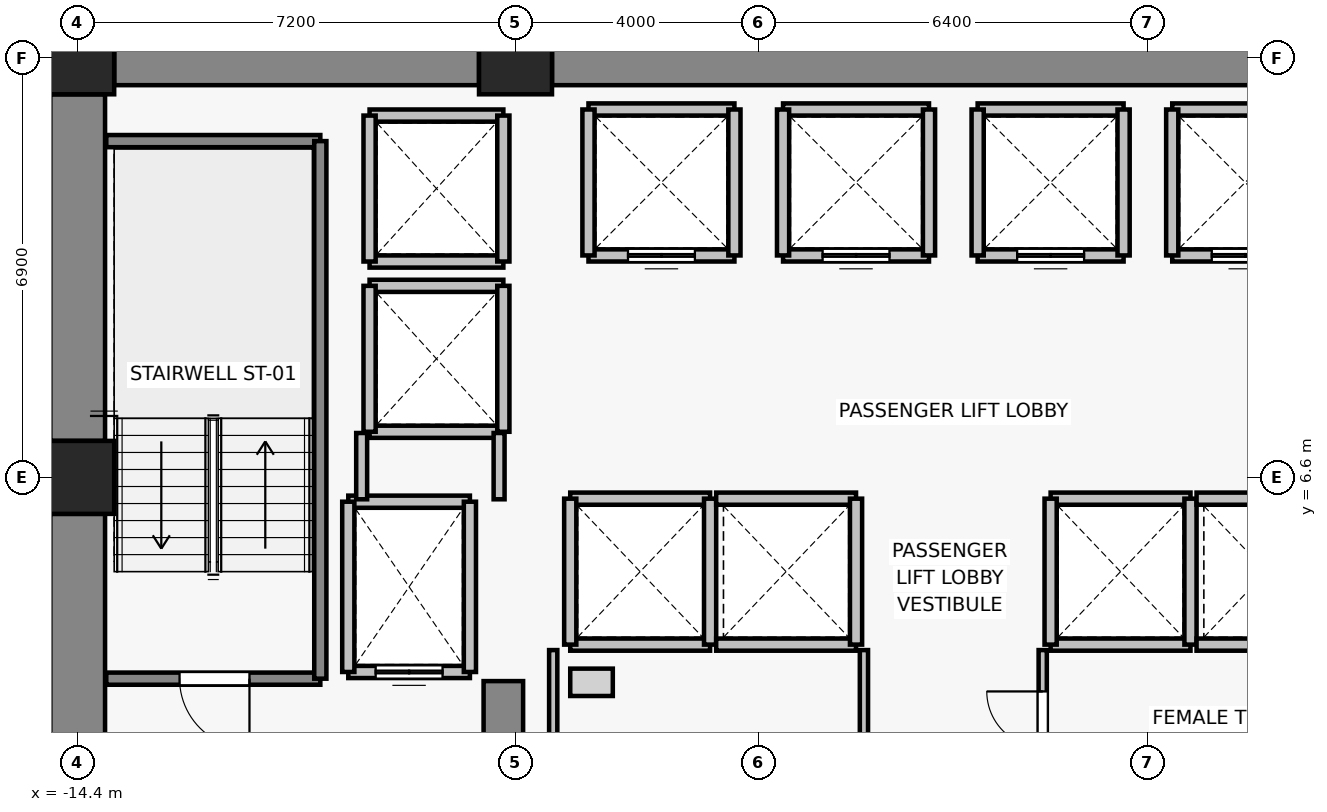
"""IFC4 building model, lengths in metres.
Left out: names, types, materials, properties, quantities, classifications, styles, units other than length and angle.
Written with IfcOpenShell. Run it as: python <this file> out.ifc"""

import sys

from ifc_helpers import new_model, si_unit, direction, frame, frame_2d, origin, origin_2d, place, context, subcontext, project, spatial, rectangle, extrude, source, transform, mapped, element, fill, save


model = new_model("IFC4")
c1 = context("Model", 3, precision=1e-05, world=origin(), true_north=direction((0.0, 1.0)))
c2 = subcontext(c1, "Body", "Model", "MODEL_VIEW")
j1 = project(units=[si_unit("LENGTHUNIT", "METRE"), si_unit("PLANEANGLEUNIT", "RADIAN")], contexts=[c1])
p1 = place(None, origin())
s1 = spatial("IfcSite", under=j1, at=p1, CompositionType="ELEMENT")
p2 = place(p1, origin())
s2 = spatial("IfcBuilding", under=s1, at=p2, CompositionType="ELEMENT")
p3 = place(p2, frame((0.0, 0.0, 57.1)))
s3 = spatial("IfcBuildingStorey", under=s2, at=p3, CompositionType="ELEMENT", Elevation=57.1)
for number, where, z_axis, x_axis in (
    (1, (-14.4, 6.6, 0.0), (0.0, 0.0, 1.0), (1.0, 0.0, 0.0)),
    (2, (-14.4, 13.5, 0.0), (0.0, 0.0, 1.0), (1.0, 0.0, 0.0)),
    (3, (-7.2, 13.5, 0.0), (0.0, 0.0, 1.0), (1.0, 0.0, 0.0)),
):
    element("IfcColumn", number, at=place(p3, frame(where, z_axis=z_axis, x_axis=x_axis)), inside=s3, PredefinedType="COLUMN", context=c2, shape_type="SweptSolid", body=[
        extrude(rectangle(XDim=1.2, YDim=1.2, at=origin_2d()), origin(), (0.0, 0.0, 1.0), 3.3),
    ])
p4 = place(p3, frame((-13.8, 13.5, 0.0), z_axis=(0.0, 0.0, 1.0), x_axis=(1.0, 0.0, 0.0)))
e4 = element("IfcWall", 4, at=p4, inside=s3, PredefinedType="SHEAR", context=c2, shape_type="SweptSolid", body=[
    extrude(rectangle(XDim=6.0, YDim=0.9, at=frame_2d((3.0, 0.0))), origin(), (0.0, 0.0, 1.0), 3.075),
])
p5 = place(p3, frame((-6.6, 13.5, 0.0), z_axis=(0.0, 0.0, 1.0), x_axis=(1.0, 0.0, 0.0)))
e5 = element("IfcWall", 5, at=p5, inside=s3, PredefinedType="SHEAR", context=c2, shape_type="SweptSolid", body=[
    extrude(rectangle(XDim=13.2, YDim=0.9, at=frame_2d((6.6, 0.0))), origin(), (0.0, 0.0, 1.0), 3.075),
])
p6 = place(p3, frame((-14.4, -0.6, 0.0), z_axis=(0.0, 0.0, 1.0), x_axis=(0.0, 1.0, 0.0)))
e6 = element("IfcWall", 6, at=p6, inside=s3, PredefinedType="SHEAR", context=c2, shape_type="SweptSolid", body=[
    extrude(rectangle(XDim=6.6, YDim=0.9, at=frame_2d((3.3, 0.0))), origin(), (0.0, 0.0, 1.0), 3.075),
])
p7 = place(p3, frame((-14.4, 7.2, 0.0), z_axis=(0.0, 0.0, 1.0), x_axis=(0.0, 1.0, 0.0)))
e7 = element("IfcWall", 7, at=p7, inside=s3, PredefinedType="SHEAR", context=c2, shape_type="SweptSolid", body=[
    extrude(rectangle(XDim=5.7, YDim=0.9, at=frame_2d((2.85, 0.0))), origin(), (0.0, 0.0, 1.0), 3.075),
])
p8 = place(p3, frame((-7.4, -0.75, 0.0), z_axis=(0.0, 0.0, 1.0), x_axis=(0.0, 1.0, 0.0)))
e8 = element("IfcWall", 8, at=p8, inside=s3, PredefinedType="SHEAR", context=c2, shape_type="SweptSolid", body=[
    extrude(rectangle(XDim=4.0, YDim=0.65, at=frame_2d((2.0, 0.0))), origin(), (0.0, 0.0, 1.0), 3.075),
])
p9 = place(p3, frame((-7.95, 3.4, 0.0), z_axis=(0.0, 0.0, 1.0), x_axis=(-1.0, 0.0, 0.0)))
e9 = element("IfcWall", 9, at=p9, inside=s3, PredefinedType="SOLIDWALL", context=c2, shape_type="SweptSolid", body=[
    extrude(rectangle(XDim=2.0, YDim=0.2, at=frame_2d((1.0, 0.0))), origin(), (0.0, 0.0, 1.0), 3.075),
])
p10 = place(p9, frame((0.45, 0.0, 0.0)))
e10 = element("IfcOpeningElement", 10, at=p10, cuts=e9, PredefinedType="OPENING", context=c2, shape_type="SweptSolid", body=[
    extrude(rectangle(XDim=1.1, YDim=2.2, at=frame_2d((0.55, 1.1))), frame((0.0, 0.11, 0.0), z_axis=(0.0, -1.0, 0.0), x_axis=(1.0, 0.0, 0.0)), (0.0, 0.0, 1.0), 0.22),
])
p11 = place(p3, frame((-9.95, 6.2, 0.0), z_axis=(0.0, 0.0, 1.0), x_axis=(1.0, 0.0, 0.0)))
e11 = element("IfcWall", 11, at=p11, inside=s3, PredefinedType="SOLIDWALL", context=c2, shape_type="SweptSolid", body=[
    extrude(rectangle(XDim=2.0, YDim=0.2, at=frame_2d((1.0, 0.0))), origin(), (0.0, 0.0, 1.0), 3.075),
])
for number, where, z_axis, x_axis in (
    (12, (-9.95, 3.4, 0.0), (0.0, 0.0, 1.0), (0.0, 1.0, 0.0)),
    (13, (-7.95, 6.2, 0.0), (0.0, 0.0, 1.0), (0.0, -1.0, 0.0)),
):
    element("IfcWall", number, at=place(p3, frame(where, z_axis=z_axis, x_axis=x_axis)), inside=s3, PredefinedType="SOLIDWALL", context=c2, shape_type="SweptSolid", body=[
        extrude(rectangle(XDim=2.8, YDim=0.2, at=frame_2d((1.4, 0.0))), origin(), (0.0, 0.0, 1.0), 3.075),
    ])
p12 = place(p3, frame((-3.6, 10.25, 0.0), z_axis=(0.0, 0.0, 1.0), x_axis=(-1.0, 0.0, 0.0)))
e14 = element("IfcWall", 14, at=p12, inside=s3, PredefinedType="SOLIDWALL", context=c2, shape_type="SweptSolid", body=[
    extrude(rectangle(XDim=2.4, YDim=0.2, at=frame_2d((1.2, 0.0))), origin(), (0.0, 0.0, 1.0), 3.075),
])
p13 = place(p12, frame((0.65, 0.0, 0.0)))
e15 = element("IfcOpeningElement", 15, at=p13, cuts=e14, PredefinedType="OPENING", context=c2, shape_type="SweptSolid", body=[
    extrude(rectangle(XDim=1.1, YDim=2.2, at=frame_2d((0.55, 1.1))), frame((0.0, 0.11, 0.0), z_axis=(0.0, -1.0, 0.0), x_axis=(1.0, 0.0, 0.0)), (0.0, 0.0, 1.0), 0.22),
])
for number, where, z_axis, x_axis in (
    (16, (-6.0, 12.65, 0.0), (0.0, 0.0, 1.0), (1.0, 0.0, 0.0)),
    (17, (-6.0, 10.25, 0.0), (0.0, 0.0, 1.0), (0.0, 1.0, 0.0)),
    (18, (-3.6, 12.65, 0.0), (0.0, 0.0, 1.0), (0.0, -1.0, 0.0)),
):
    element("IfcWall", number, at=place(p3, frame(where, z_axis=z_axis, x_axis=x_axis)), inside=s3, PredefinedType="SOLIDWALL", context=c2, shape_type="SweptSolid", body=[
        extrude(rectangle(XDim=2.4, YDim=0.2, at=frame_2d((1.2, 0.0))), origin(), (0.0, 0.0, 1.0), 3.075),
    ])
p14 = place(p3, frame((-0.4, 10.25, 0.0), z_axis=(0.0, 0.0, 1.0), x_axis=(-1.0, 0.0, 0.0)))
e19 = element("IfcWall", 19, at=p14, inside=s3, PredefinedType="SOLIDWALL", context=c2, shape_type="SweptSolid", body=[
    extrude(rectangle(XDim=2.4, YDim=0.2, at=frame_2d((1.2, 0.0))), origin(), (0.0, 0.0, 1.0), 3.075),
])
p15 = place(p14, frame((0.65, 0.0, 0.0)))
e20 = element("IfcOpeningElement", 20, at=p15, cuts=e19, PredefinedType="OPENING", context=c2, shape_type="SweptSolid", body=[
    extrude(rectangle(XDim=1.1, YDim=2.2, at=frame_2d((0.55, 1.1))), frame((0.0, 0.11, 0.0), z_axis=(0.0, -1.0, 0.0), x_axis=(1.0, 0.0, 0.0)), (0.0, 0.0, 1.0), 0.22),
])
p16 = place(p3, frame((-2.8, 12.65, 0.0), z_axis=(0.0, 0.0, 1.0), x_axis=(1.0, 0.0, 0.0)))
e21 = element("IfcWall", 21, at=p16, inside=s3, PredefinedType="SOLIDWALL", context=c2, shape_type="SweptSolid", body=[
    extrude(rectangle(XDim=2.4, YDim=0.2, at=frame_2d((1.2, 0.0))), origin(), (0.0, 0.0, 1.0), 3.075),
])
for number, where, z_axis, x_axis in (
    (22, (-2.8, 10.25, 0.0), (0.0, 0.0, 1.0), (0.0, 1.0, 0.0)),
    (23, (-0.4, 12.65, 0.0), (0.0, 0.0, 1.0), (0.0, -1.0, 0.0)),
):
    element("IfcWall", number, at=place(p3, frame(where, z_axis=z_axis, x_axis=x_axis)), inside=s3, PredefinedType="SOLIDWALL", context=c2, shape_type="SweptSolid", body=[
        extrude(rectangle(XDim=2.4, YDim=0.2, at=frame_2d((1.2, 0.0))), origin(), (0.0, 0.0, 1.0), 3.075),
    ])
p17 = place(p3, frame((2.8, 10.25, 0.0), z_axis=(0.0, 0.0, 1.0), x_axis=(-1.0, 0.0, 0.0)))
e24 = element("IfcWall", 24, at=p17, inside=s3, PredefinedType="SOLIDWALL", context=c2, shape_type="SweptSolid", body=[
    extrude(rectangle(XDim=2.4, YDim=0.2, at=frame_2d((1.2, 0.0))), origin(), (0.0, 0.0, 1.0), 3.075),
])
p18 = place(p17, frame((0.65, 0.0, 0.0)))
e25 = element("IfcOpeningElement", 25, at=p18, cuts=e24, PredefinedType="OPENING", context=c2, shape_type="SweptSolid", body=[
    extrude(rectangle(XDim=1.1, YDim=2.2, at=frame_2d((0.55, 1.1))), frame((0.0, 0.11, 0.0), z_axis=(0.0, -1.0, 0.0), x_axis=(1.0, 0.0, 0.0)), (0.0, 0.0, 1.0), 0.22),
])
p19 = place(p3, frame((0.4, 12.65, 0.0), z_axis=(0.0, 0.0, 1.0), x_axis=(1.0, 0.0, 0.0)))
e26 = element("IfcWall", 26, at=p19, inside=s3, PredefinedType="SOLIDWALL", context=c2, shape_type="SweptSolid", body=[
    extrude(rectangle(XDim=2.4, YDim=0.2, at=frame_2d((1.2, 0.0))), origin(), (0.0, 0.0, 1.0), 3.075),
])
for number, where, z_axis, x_axis in (
    (27, (0.4, 10.25, 0.0), (0.0, 0.0, 1.0), (0.0, 1.0, 0.0)),
    (28, (2.8, 12.65, 0.0), (0.0, 0.0, 1.0), (0.0, -1.0, 0.0)),
):
    element("IfcWall", number, at=place(p3, frame(where, z_axis=z_axis, x_axis=x_axis)), inside=s3, PredefinedType="SOLIDWALL", context=c2, shape_type="SweptSolid", body=[
        extrude(rectangle(XDim=2.4, YDim=0.2, at=frame_2d((1.2, 0.0))), origin(), (0.0, 0.0, 1.0), 3.075),
    ])
p20 = place(p3, frame((6.0, 10.25, 0.0), z_axis=(0.0, 0.0, 1.0), x_axis=(-1.0, 0.0, 0.0)))
e29 = element("IfcWall", 29, at=p20, inside=s3, PredefinedType="SOLIDWALL", context=c2, shape_type="SweptSolid", body=[
    extrude(rectangle(XDim=2.4, YDim=0.2, at=frame_2d((1.2, 0.0))), origin(), (0.0, 0.0, 1.0), 3.075),
])
p21 = place(p20, frame((0.65, 0.0, 0.0)))
e30 = element("IfcOpeningElement", 30, at=p21, cuts=e29, PredefinedType="OPENING", context=c2, shape_type="SweptSolid", body=[
    extrude(rectangle(XDim=1.1, YDim=2.2, at=frame_2d((0.55, 1.1))), frame((0.0, 0.11, 0.0), z_axis=(0.0, -1.0, 0.0), x_axis=(1.0, 0.0, 0.0)), (0.0, 0.0, 1.0), 0.22),
])
for number, where, z_axis, x_axis in (
    (31, (3.6, 12.65, 0.0), (0.0, 0.0, 1.0), (1.0, 0.0, 0.0)),
    (32, (3.6, 10.25, 0.0), (0.0, 0.0, 1.0), (0.0, 1.0, 0.0)),
):
    element("IfcWall", number, at=place(p3, frame(where, z_axis=z_axis, x_axis=x_axis)), inside=s3, PredefinedType="SOLIDWALL", context=c2, shape_type="SweptSolid", body=[
        extrude(rectangle(XDim=2.4, YDim=0.2, at=frame_2d((1.2, 0.0))), origin(), (0.0, 0.0, 1.0), 3.075),
    ])
for number, where, z_axis, x_axis in (
    (33, (-4.0, 3.85, 0.0), (0.0, 0.0, 1.0), (-1.0, 0.0, 0.0)),
    (34, (-6.3, 6.25, 0.0), (0.0, 0.0, 1.0), (1.0, 0.0, 0.0)),
):
    element("IfcWall", number, at=place(p3, frame(where, z_axis=z_axis, x_axis=x_axis)), inside=s3, PredefinedType="SOLIDWALL", context=c2, shape_type="SweptSolid", body=[
        extrude(rectangle(XDim=2.3, YDim=0.2, at=frame_2d((1.15, 0.0))), origin(), (0.0, 0.0, 1.0), 3.075),
    ])
for number, where, z_axis, x_axis in (
    (35, (-6.3, 3.85, 0.0), (0.0, 0.0, 1.0), (0.0, 1.0, 0.0)),
    (36, (-4.0, 6.25, 0.0), (0.0, 0.0, 1.0), (0.0, -1.0, 0.0)),
):
    element("IfcWall", number, at=place(p3, frame(where, z_axis=z_axis, x_axis=x_axis)), inside=s3, PredefinedType="SOLIDWALL", context=c2, shape_type="SweptSolid", body=[
        extrude(rectangle(XDim=2.4, YDim=0.2, at=frame_2d((1.2, 0.0))), origin(), (0.0, 0.0, 1.0), 3.075),
    ])
for number, where, z_axis, x_axis in (
    (37, (-1.6, 3.85, 0.0), (0.0, 0.0, 1.0), (-1.0, 0.0, 0.0)),
    (38, (-3.9, 6.25, 0.0), (0.0, 0.0, 1.0), (1.0, 0.0, 0.0)),
):
    element("IfcWall", number, at=place(p3, frame(where, z_axis=z_axis, x_axis=x_axis)), inside=s3, PredefinedType="SOLIDWALL", context=c2, shape_type="SweptSolid", body=[
        extrude(rectangle(XDim=2.3, YDim=0.2, at=frame_2d((1.15, 0.0))), origin(), (0.0, 0.0, 1.0), 3.075),
    ])
p22 = place(p3, frame((-1.6, 6.25, 0.0), z_axis=(0.0, 0.0, 1.0), x_axis=(0.0, -1.0, 0.0)))
e39 = element("IfcWall", 39, at=p22, inside=s3, PredefinedType="SOLIDWALL", context=c2, shape_type="SweptSolid", body=[
    extrude(rectangle(XDim=2.4, YDim=0.2, at=frame_2d((1.2, 0.0))), origin(), (0.0, 0.0, 1.0), 3.075),
])
for number, where, z_axis, x_axis in (
    (40, (3.9, 3.85, 0.0), (0.0, 0.0, 1.0), (-1.0, 0.0, 0.0)),
    (41, (1.6, 6.25, 0.0), (0.0, 0.0, 1.0), (1.0, 0.0, 0.0)),
):
    element("IfcWall", number, at=place(p3, frame(where, z_axis=z_axis, x_axis=x_axis)), inside=s3, PredefinedType="SOLIDWALL", context=c2, shape_type="SweptSolid", body=[
        extrude(rectangle(XDim=2.3, YDim=0.2, at=frame_2d((1.15, 0.0))), origin(), (0.0, 0.0, 1.0), 3.075),
    ])
for number, where, z_axis, x_axis in (
    (42, (1.6, 3.85, 0.0), (0.0, 0.0, 1.0), (0.0, 1.0, 0.0)),
    (43, (3.9, 6.25, 0.0), (0.0, 0.0, 1.0), (0.0, -1.0, 0.0)),
):
    element("IfcWall", number, at=place(p3, frame(where, z_axis=z_axis, x_axis=x_axis)), inside=s3, PredefinedType="SOLIDWALL", context=c2, shape_type="SweptSolid", body=[
        extrude(rectangle(XDim=2.4, YDim=0.2, at=frame_2d((1.2, 0.0))), origin(), (0.0, 0.0, 1.0), 3.075),
    ])
for number, where, z_axis, x_axis in (
    (44, (6.3, 3.85, 0.0), (0.0, 0.0, 1.0), (-1.0, 0.0, 0.0)),
    (45, (4.0, 6.25, 0.0), (0.0, 0.0, 1.0), (1.0, 0.0, 0.0)),
):
    element("IfcWall", number, at=place(p3, frame(where, z_axis=z_axis, x_axis=x_axis)), inside=s3, PredefinedType="SOLIDWALL", context=c2, shape_type="SweptSolid", body=[
        extrude(rectangle(XDim=2.3, YDim=0.2, at=frame_2d((1.15, 0.0))), origin(), (0.0, 0.0, 1.0), 3.075),
    ])
for number, where, z_axis, x_axis in (
    (46, (-7.4, 7.35, 0.0), (0.0, 0.0, 1.0), (-1.0, 0.0, 0.0)),
    (47, (-9.6, 9.75, 0.0), (0.0, 0.0, 1.0), (1.0, 0.0, 0.0)),
):
    element("IfcWall", number, at=place(p3, frame(where, z_axis=z_axis, x_axis=x_axis)), inside=s3, PredefinedType="SOLIDWALL", context=c2, shape_type="SweptSolid", body=[
        extrude(rectangle(XDim=2.2, YDim=0.2, at=frame_2d((1.1, 0.0))), origin(), (0.0, 0.0, 1.0), 2.465),
    ])
p23 = place(p3, frame((-9.6, 7.35, 0.0), z_axis=(0.0, 0.0, 1.0), x_axis=(0.0, 1.0, 0.0)))
e48 = element("IfcWall", 48, at=p23, inside=s3, PredefinedType="SOLIDWALL", context=c2, shape_type="SweptSolid", body=[
    extrude(rectangle(XDim=2.4, YDim=0.2, at=frame_2d((1.2, 0.0))), origin(), (0.0, 0.0, 1.0), 3.075),
])
p24 = place(p3, frame((-7.4, 9.75, 0.0), z_axis=(0.0, 0.0, 1.0), x_axis=(0.0, -1.0, 0.0)))
e49 = element("IfcWall", 49, at=p24, inside=s3, PredefinedType="SOLIDWALL", context=c2, shape_type="SweptSolid", body=[
    extrude(rectangle(XDim=2.4, YDim=0.2, at=frame_2d((1.2, 0.0))), origin(), (0.0, 0.0, 1.0), 2.465),
])
for number, where, z_axis, x_axis in (
    (50, (-7.4, 10.15, 0.0), (0.0, 0.0, 1.0), (-1.0, 0.0, 0.0)),
    (51, (-9.6, 12.55, 0.0), (0.0, 0.0, 1.0), (1.0, 0.0, 0.0)),
):
    element("IfcWall", number, at=place(p3, frame(where, z_axis=z_axis, x_axis=x_axis)), inside=s3, PredefinedType="SOLIDWALL", context=c2, shape_type="SweptSolid", body=[
        extrude(rectangle(XDim=2.2, YDim=0.2, at=frame_2d((1.1, 0.0))), origin(), (0.0, 0.0, 1.0), 2.465),
    ])
p25 = place(p3, frame((-9.6, 10.15, 0.0), z_axis=(0.0, 0.0, 1.0), x_axis=(0.0, 1.0, 0.0)))
e52 = element("IfcWall", 52, at=p25, inside=s3, PredefinedType="SOLIDWALL", context=c2, shape_type="SweptSolid", body=[
    extrude(rectangle(XDim=2.4, YDim=0.2, at=frame_2d((1.2, 0.0))), origin(), (0.0, 0.0, 1.0), 3.075),
])
p26 = place(p3, frame((-7.4, 12.55, 0.0), z_axis=(0.0, 0.0, 1.0), x_axis=(0.0, -1.0, 0.0)))
e53 = element("IfcWall", 53, at=p26, inside=s3, PredefinedType="SOLIDWALL", context=c2, shape_type="SweptSolid", body=[
    extrude(rectangle(XDim=2.4, YDim=0.2, at=frame_2d((1.2, 0.0))), origin(), (0.0, 0.0, 1.0), 2.465),
])
p27 = place(p3, frame((-10.41, 3.29, 0.0), z_axis=(0.0, 0.0, 1.0), x_axis=(-1.0, 0.0, 0.0)))
e54 = element("IfcWall", 54, at=p27, inside=s3, PredefinedType="SOLIDWALL", context=c2, shape_type="SweptSolid", body=[
    extrude(rectangle(XDim=3.52, YDim=0.2, at=frame_2d((1.76, 0.0))), origin(), (0.0, 0.0, 1.0), 3.075),
])
p28 = place(p27, frame((1.165, 0.0, 0.0)))
e55 = element("IfcOpeningElement", 55, at=p28, cuts=e54, PredefinedType="OPENING", context=c2, shape_type="SweptSolid", body=[
    extrude(rectangle(XDim=1.15, YDim=2.15, at=frame_2d((0.575, 1.075))), frame((0.0, 0.11, 0.0), z_axis=(0.0, -1.0, 0.0), x_axis=(1.0, 0.0, 0.0)), (0.0, 0.0, 1.0), 0.22),
])
p29 = place(p3, frame((-13.93, 12.13, 0.0), z_axis=(0.0, 0.0, 1.0), x_axis=(1.0, 0.0, 0.0)))
e56 = element("IfcWall", 56, at=p29, inside=s3, PredefinedType="SOLIDWALL", context=c2, shape_type="SweptSolid", body=[
    extrude(rectangle(XDim=3.52, YDim=0.2, at=frame_2d((1.76, 0.0))), origin(), (0.0, 0.0, 1.0), 3.075),
])
p30 = place(p3, frame((-10.41, 12.13, 0.0), z_axis=(0.0, 0.0, 1.0), x_axis=(0.0, -1.0, 0.0)))
e57 = element("IfcWall", 57, at=p30, inside=s3, PredefinedType="SOLIDWALL", context=c2, shape_type="SweptSolid", body=[
    extrude(rectangle(XDim=8.84, YDim=0.2, at=frame_2d((4.42, 0.0))), origin(), (0.0, 0.0, 1.0), 3.075),
])
p31 = place(p3, frame((-9.73, 6.24, 0.0), z_axis=(0.0, 0.0, 1.0), x_axis=(0.0, 1.0, 0.0)))
e58 = element("IfcWall", 58, at=p31, inside=s3, PredefinedType="PARTITIONING", context=c2, shape_type="SweptSolid", body=[
    extrude(rectangle(XDim=1.09, YDim=0.18, at=frame_2d((0.545, 0.0))), origin(), (0.0, 0.0, 1.0), 3.075),
])
p32 = place(p3, frame((-7.47, 7.33, 0.0), z_axis=(0.0, 0.0, 1.0), x_axis=(0.0, -1.0, 0.0)))
e59 = element("IfcWall", 59, at=p32, inside=s3, PredefinedType="PARTITIONING", context=c2, shape_type="SweptSolid", body=[
    extrude(rectangle(XDim=1.09, YDim=0.18, at=frame_2d((0.545, 0.0))), origin(), (0.0, 0.0, 1.0), 2.465),
])
p33 = place(p3, frame((-6.58, -0.73, 0.0), z_axis=(0.0, 0.0, 1.0), x_axis=(0.0, 1.0, 0.0)))
e60 = element("IfcWall", 60, at=p33, inside=s3, PredefinedType="PARTITIONING", context=c2, shape_type="SweptSolid", body=[
    extrude(rectangle(XDim=4.49, YDim=0.135, at=frame_2d((2.245, 0.0))), origin(), (0.0, 0.0, 1.0), 3.075),
])
p34 = place(p3, frame((-1.47, 3.76, 0.0), z_axis=(0.0, 0.0, 1.0), x_axis=(0.0, -1.0, 0.0)))
e61 = element("IfcWall", 61, at=p34, inside=s3, PredefinedType="PARTITIONING", context=c2, shape_type="SweptSolid", body=[
    extrude(rectangle(XDim=4.49, YDim=0.135, at=frame_2d((2.245, 0.0))), origin(), (0.0, 0.0, 1.0), 3.075),
])
p35 = place(p34, frame((1.8, 0.0, 0.0)))
e62 = element("IfcOpeningElement", 62, at=p35, cuts=e61, PredefinedType="OPENING", context=c2, shape_type="SweptSolid", body=[
    extrude(rectangle(XDim=0.92, YDim=2.1, at=frame_2d((0.46, 1.05))), frame((0.0, 0.077, 0.0), z_axis=(0.0, -1.0, 0.0), x_axis=(1.0, 0.0, 0.0)), (0.0, 0.0, 1.0), 0.155),
])
p36 = place(p3, frame((1.47, 1.48, 0.0), z_axis=(0.0, 0.0, 1.0), x_axis=(0.0, 1.0, 0.0)))
e63 = element("IfcWall", 63, at=p36, inside=s3, PredefinedType="PARTITIONING", context=c2, shape_type="SweptSolid", body=[
    extrude(rectangle(XDim=2.28, YDim=0.135, at=frame_2d((1.14, 0.0))), origin(), (0.0, 0.0, 1.0), 3.075),
])
p37 = place(p36, frame((0.68, 0.0, 0.0)))
e64 = element("IfcOpeningElement", 64, at=p37, cuts=e63, PredefinedType="OPENING", context=c2, shape_type="SweptSolid", body=[
    extrude(rectangle(XDim=0.92, YDim=2.1, at=frame_2d((0.46, 1.05))), frame((0.0, 0.077, 0.0), z_axis=(0.0, -1.0, 0.0), x_axis=(1.0, 0.0, 0.0)), (0.0, 0.0, 1.0), 0.155),
])
m1 = source(origin(), c2, "Body", "SweptSolid", [
    extrude(rectangle(XDim=1.1, YDim=2.2, at=frame_2d((0.55, 1.1))), frame((0.0, 0.025, 0.0), z_axis=(0.0, -1.0, 0.0), x_axis=(1.0, 0.0, 0.0)), (0.0, 0.0, 1.0), 0.05),
])
p38 = place(p10, origin())
e65 = element("IfcDoor", 65, at=p38, inside=s3, OperationType="DOUBLE_DOOR_SLIDING", PredefinedType="DOOR", context=c2, shape_type="MappedRepresentation", body=[
    mapped(m1, transform((0.0, 0.0, 0.0), x_axis=(1.0, 0.0, 0.0), y_axis=(0.0, 1.0, 0.0), z_axis=(0.0, 0.0, 1.0), scale=1.0)),
])
fill(e10, e65)
p39 = place(p13, origin())
e66 = element("IfcDoor", 66, at=p39, inside=s3, OperationType="DOUBLE_DOOR_SLIDING", PredefinedType="DOOR", context=c2, shape_type="MappedRepresentation", body=[
    mapped(m1, transform((0.0, 0.0, 0.0), x_axis=(1.0, 0.0, 0.0), y_axis=(0.0, 1.0, 0.0), z_axis=(0.0, 0.0, 1.0), scale=1.0)),
])
fill(e15, e66)
p40 = place(p15, origin())
e67 = element("IfcDoor", 67, at=p40, inside=s3, OperationType="DOUBLE_DOOR_SLIDING", PredefinedType="DOOR", context=c2, shape_type="MappedRepresentation", body=[
    mapped(m1, transform((0.0, 0.0, 0.0), x_axis=(1.0, 0.0, 0.0), y_axis=(0.0, 1.0, 0.0), z_axis=(0.0, 0.0, 1.0), scale=1.0)),
])
fill(e20, e67)
p41 = place(p18, origin())
e68 = element("IfcDoor", 68, at=p41, inside=s3, OperationType="DOUBLE_DOOR_SLIDING", PredefinedType="DOOR", context=c2, shape_type="MappedRepresentation", body=[
    mapped(m1, transform((0.0, 0.0, 0.0), x_axis=(1.0, 0.0, 0.0), y_axis=(0.0, 1.0, 0.0), z_axis=(0.0, 0.0, 1.0), scale=1.0)),
])
fill(e25, e68)
p42 = place(p21, origin())
e69 = element("IfcDoor", 69, at=p42, inside=s3, OperationType="DOUBLE_DOOR_SLIDING", PredefinedType="DOOR", context=c2, shape_type="MappedRepresentation", body=[
    mapped(m1, transform((0.0, 0.0, 0.0), x_axis=(1.0, 0.0, 0.0), y_axis=(0.0, 1.0, 0.0), z_axis=(0.0, 0.0, 1.0), scale=1.0)),
])
fill(e30, e69)
m2 = source(origin(), c2, "Body", "SweptSolid", [
    extrude(rectangle(XDim=1.15, YDim=2.15, at=frame_2d((0.575, 1.075))), frame((0.0, 0.025, 0.0), z_axis=(0.0, -1.0, 0.0), x_axis=(1.0, 0.0, 0.0)), (0.0, 0.0, 1.0), 0.05),
])
p43 = place(p28, origin())
e70 = element("IfcDoor", 70, at=p43, inside=s3, OperationType="SINGLE_SWING_LEFT", PredefinedType="DOOR", context=c2, shape_type="MappedRepresentation", body=[
    mapped(m2, transform((0.0, 0.0, 0.0), x_axis=(1.0, 0.0, 0.0), y_axis=(0.0, 1.0, 0.0), z_axis=(0.0, 0.0, 1.0), scale=1.0)),
])
fill(e55, e70)
m3 = source(origin(), c2, "Body", "SweptSolid", [
    extrude(rectangle(XDim=0.92, YDim=2.1, at=frame_2d((0.46, 1.05))), frame((0.0, 0.025, 0.0), z_axis=(0.0, -1.0, 0.0), x_axis=(1.0, 0.0, 0.0)), (0.0, 0.0, 1.0), 0.05),
])
p44 = place(p37, origin())
e71 = element("IfcDoor", 71, at=p44, inside=s3, OperationType="SINGLE_SWING_RIGHT", PredefinedType="DOOR", context=c2, shape_type="MappedRepresentation", body=[
    mapped(m3, transform((0.0, 0.0, 0.0), x_axis=(1.0, 0.0, 0.0), y_axis=(0.0, 1.0, 0.0), z_axis=(0.0, 0.0, 1.0), scale=1.0)),
])
fill(e64, e71)
save(model, sys.argv[1])
